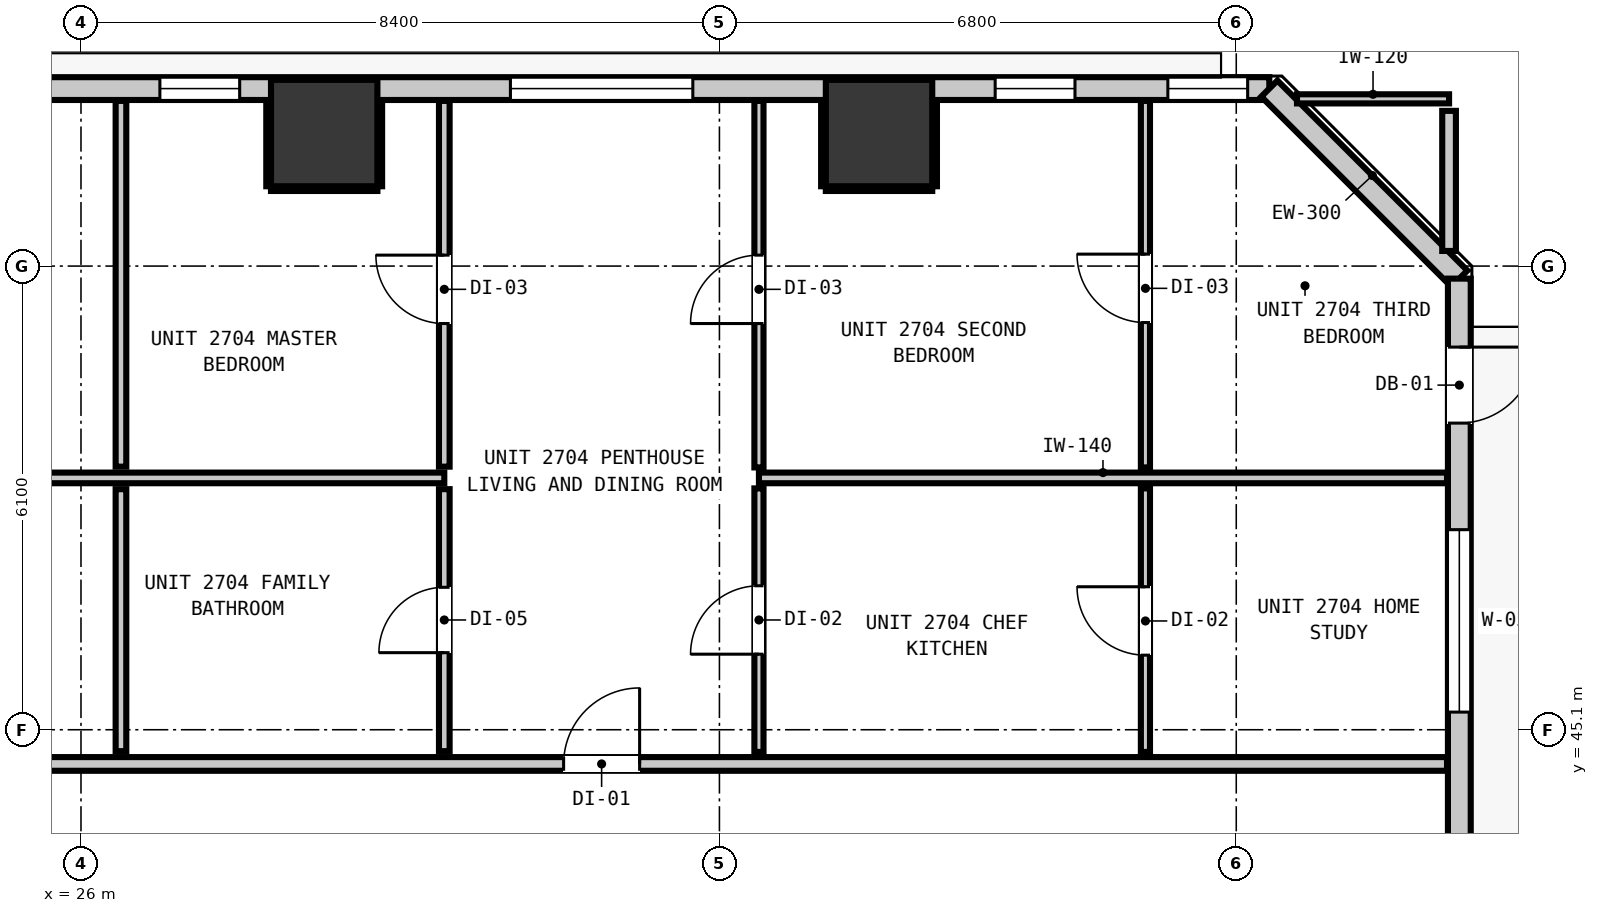
"""IFC4 building model, lengths in metres.
Left out: names, types, materials, properties, quantities, classifications, styles, units other than length and angle.
Written with IfcOpenShell. Run it as: python <this file> out.ifc"""

import sys

from ifc_helpers import new_model, si_unit, direction, frame, frame_2d, origin, origin_2d, place, context, subcontext, project, spatial, rectangle, extrude, element, fill, save


model = new_model("IFC4")
c1 = context("Model", 3, precision=1e-05, world=origin(), true_north=direction((0.0, 1.0)))
c2 = subcontext(c1, "Body", "Model", "MODEL_VIEW")
j1 = project(units=[si_unit("LENGTHUNIT", "METRE"), si_unit("PLANEANGLEUNIT", "RADIAN")], contexts=[c1])
p1 = place(None, origin())
s1 = spatial("IfcSite", under=j1, at=p1, CompositionType="ELEMENT")
p2 = place(p1, origin())
s2 = spatial("IfcBuilding", under=s1, at=p2, CompositionType="ELEMENT")
p3 = place(p2, frame((0.0, 0.0, 96.12)))
s3 = spatial("IfcBuildingStorey", under=s2, at=p3, CompositionType="ELEMENT", Elevation=96.12)
for number, where, z_axis, x_axis in (
    (1, (29.2, 52.95, 0.0), (0.0, 0.0, 1.0), (1.0, 0.0, 0.0)),
    (2, (36.5, 52.95, 0.0), (0.0, 0.0, 1.0), (1.0, 0.0, 0.0)),
):
    element("IfcColumn", number, at=place(p3, frame(where, z_axis=z_axis, x_axis=x_axis)), inside=s3, PredefinedType="COLUMN", context=c2, shape_type="SweptSolid", body=[
        extrude(rectangle(XDim=1.4, YDim=1.4, at=origin_2d()), origin(), (0.0, 0.0, 1.0), 3.32),
    ])
p4 = place(p3, frame((4.165, 53.535, 0.0), z_axis=(0.0, 0.0, 1.0), x_axis=(1.0, 0.0, 0.0)))
e3 = element("IfcWall", 3, at=p4, inside=s3, PredefinedType="STANDARD", context=c2, shape_type="SweptSolid", body=[
    extrude(rectangle(XDim=37.47, YDim=0.3, at=frame_2d((18.735, 0.0))), origin(), (0.0, 0.0, 1.0), 3.06),
])
p5 = place(p4, frame((0.901, 0.0, 0.0)))
e4 = element("IfcOpeningElement", 4, at=p5, cuts=e3, PredefinedType="OPENING", context=c2, shape_type="SweptSolid", body=[
    extrude(rectangle(XDim=1.0, YDim=2.15, at=frame_2d((0.5, 1.075))), frame((0.0, 0.16, 0.0), z_axis=(0.0, -1.0, 0.0), x_axis=(1.0, 0.0, 0.0)), (0.0, 0.0, 1.0), 0.32),
])
p6 = place(p4, frame((11.245, 0.0, 0.85)))
e5 = element("IfcOpeningElement", 5, at=p6, cuts=e3, PredefinedType="OPENING", context=c2, shape_type="SweptSolid", body=[
    extrude(rectangle(XDim=2.4, YDim=1.95, at=frame_2d((1.2, 0.975))), frame((0.0, 0.16, 0.0), z_axis=(0.0, -1.0, 0.0), x_axis=(1.0, 0.0, 0.0)), (0.0, 0.0, 1.0), 0.32),
])
p7 = place(p4, frame((2.286, 0.0, 0.85)))
e6 = element("IfcOpeningElement", 6, at=p7, cuts=e3, PredefinedType="OPENING", context=c2, shape_type="SweptSolid", body=[
    extrude(rectangle(XDim=1.05, YDim=1.65, at=frame_2d((0.525, 0.825))), frame((0.0, 0.16, 0.0), z_axis=(0.0, -1.0, 0.0), x_axis=(1.0, 0.0, 0.0)), (0.0, 0.0, 1.0), 0.32),
])
p8 = place(p4, frame((18.598, 0.0, 0.85)))
e7 = element("IfcOpeningElement", 7, at=p8, cuts=e3, PredefinedType="OPENING", context=c2, shape_type="SweptSolid", body=[
    extrude(rectangle(XDim=2.4, YDim=1.95, at=frame_2d((1.2, 0.975))), frame((0.0, 0.16, 0.0), z_axis=(0.0, -1.0, 0.0), x_axis=(1.0, 0.0, 0.0)), (0.0, 0.0, 1.0), 0.32),
])
p9 = place(p4, frame((27.485, 0.0, 0.85)))
e8 = element("IfcOpeningElement", 8, at=p9, cuts=e3, PredefinedType="OPENING", context=c2, shape_type="SweptSolid", body=[
    extrude(rectangle(XDim=2.4, YDim=1.95, at=frame_2d((1.2, 0.975))), frame((0.0, 0.16, 0.0), z_axis=(0.0, -1.0, 0.0), x_axis=(1.0, 0.0, 0.0)), (0.0, 0.0, 1.0), 0.32),
])
p10 = place(p4, frame((22.873, 0.0, 0.85)))
e9 = element("IfcOpeningElement", 9, at=p10, cuts=e3, PredefinedType="OPENING", context=c2, shape_type="SweptSolid", body=[
    extrude(rectangle(XDim=1.05, YDim=1.65, at=frame_2d((0.525, 0.825))), frame((0.0, 0.16, 0.0), z_axis=(0.0, -1.0, 0.0), x_axis=(1.0, 0.0, 0.0)), (0.0, 0.0, 1.0), 0.32),
])
p11 = place(p4, frame((33.863, 0.0, 0.85)))
e10 = element("IfcOpeningElement", 10, at=p11, cuts=e3, PredefinedType="OPENING", context=c2, shape_type="SweptSolid", body=[
    extrude(rectangle(XDim=1.05, YDim=1.65, at=frame_2d((0.525, 0.825))), frame((0.0, 0.16, 0.0), z_axis=(0.0, -1.0, 0.0), x_axis=(1.0, 0.0, 0.0)), (0.0, 0.0, 1.0), 0.32),
])
p12 = place(p4, frame((36.135, 0.0, 0.85)))
e11 = element("IfcOpeningElement", 11, at=p12, cuts=e3, PredefinedType="OPENING", context=c2, shape_type="SweptSolid", body=[
    extrude(rectangle(XDim=1.05, YDim=1.65, at=frame_2d((0.525, 0.825))), frame((0.0, 0.16, 0.0), z_axis=(0.0, -1.0, 0.0), x_axis=(1.0, 0.0, 0.0)), (0.0, 0.0, 1.0), 0.32),
])
p13 = place(p3, frame((41.635, 53.535, 0.0), z_axis=(0.0, 0.0, 1.0), x_axis=(0.707106781187, -0.707106781187, 0.0)))
e12 = element("IfcWall", 12, at=p13, inside=s3, PredefinedType="STANDARD", context=c2, shape_type="SweptSolid", body=[
    extrude(rectangle(XDim=3.536, YDim=0.3, at=frame_2d((1.768, 0.0))), origin(), (0.0, 0.0, 1.0), 3.06),
])
p14 = place(p3, frame((44.135, 51.035, 0.0), z_axis=(0.0, 0.0, 1.0), x_axis=(0.0, -1.0, 0.0)))
e13 = element("IfcWall", 13, at=p14, inside=s3, PredefinedType="STANDARD", context=c2, shape_type="SweptSolid", body=[
    extrude(rectangle(XDim=34.67, YDim=0.3, at=frame_2d((17.335, 0.0))), origin(), (0.0, 0.0, 1.0), 3.06),
])
p15 = place(p14, frame((0.901, 0.0, 0.0)))
e14 = element("IfcOpeningElement", 14, at=p15, cuts=e13, PredefinedType="OPENING", context=c2, shape_type="SweptSolid", body=[
    extrude(rectangle(XDim=1.0, YDim=2.15, at=frame_2d((0.5, 1.075))), frame((0.0, 0.16, 0.0), z_axis=(0.0, -1.0, 0.0), x_axis=(1.0, 0.0, 0.0)), (0.0, 0.0, 1.0), 0.32),
])
p16 = place(p14, frame((3.303, 0.0, 0.85)))
e15 = element("IfcOpeningElement", 15, at=p16, cuts=e13, PredefinedType="OPENING", context=c2, shape_type="SweptSolid", body=[
    extrude(rectangle(XDim=2.4, YDim=1.95, at=frame_2d((1.2, 0.975))), frame((0.0, 0.16, 0.0), z_axis=(0.0, -1.0, 0.0), x_axis=(1.0, 0.0, 0.0)), (0.0, 0.0, 1.0), 0.32),
])
p17 = place(p14, frame((21.61, 0.0, 0.85)))
e16 = element("IfcOpeningElement", 16, at=p17, cuts=e13, PredefinedType="OPENING", context=c2, shape_type="SweptSolid", body=[
    extrude(rectangle(XDim=2.4, YDim=1.95, at=frame_2d((1.2, 0.975))), frame((0.0, 0.16, 0.0), z_axis=(0.0, -1.0, 0.0), x_axis=(1.0, 0.0, 0.0)), (0.0, 0.0, 1.0), 0.32),
])
p18 = place(p3, frame((1.827, 44.65, 0.0), z_axis=(0.0, 0.0, 1.0), x_axis=(1.0, 0.0, 0.0)))
e17 = element("IfcWall", 17, at=p18, inside=s3, PredefinedType="PARTITIONING", context=c2, shape_type="SweptSolid", body=[
    extrude(rectangle(XDim=42.146, YDim=0.18, at=frame_2d((21.073, 0.0))), origin(), (0.0, 0.0, 1.0), 3.06),
])
p19 = place(p18, frame((11.176, 0.0, 0.0)))
e18 = element("IfcOpeningElement", 18, at=p19, cuts=e17, PredefinedType="OPENING", context=c2, shape_type="SweptSolid", body=[
    extrude(rectangle(XDim=1.0, YDim=2.15, at=frame_2d((0.5, 1.075))), frame((0.0, 0.1, 0.0), z_axis=(0.0, -1.0, 0.0), x_axis=(1.0, 0.0, 0.0)), (0.0, 0.0, 1.0), 0.2),
])
p20 = place(p18, frame((30.523, 0.0, 0.0)))
e19 = element("IfcOpeningElement", 19, at=p20, cuts=e17, PredefinedType="OPENING", context=c2, shape_type="SweptSolid", body=[
    extrude(rectangle(XDim=1.0, YDim=2.15, at=frame_2d((0.5, 1.075))), frame((0.0, 0.1, 0.0), z_axis=(0.0, -1.0, 0.0), x_axis=(1.0, 0.0, 0.0)), (0.0, 0.0, 1.0), 0.2),
])
p21 = place(p3, frame((1.827, 48.413, 0.0), z_axis=(0.0, 0.0, 1.0), x_axis=(1.0, 0.0, 0.0)))
e20 = element("IfcWall", 20, at=p21, inside=s3, PredefinedType="PARTITIONING", context=c2, shape_type="SweptSolid", body=[
    extrude(rectangle(XDim=28.953, YDim=0.14, at=frame_2d((14.477, 0.0))), origin(), (0.0, 0.0, 1.0), 3.06),
])
p22 = place(p21, frame((11.226, 0.0, 0.0)))
e21 = element("IfcOpeningElement", 21, at=p22, cuts=e20, PredefinedType="OPENING", context=c2, shape_type="SweptSolid", body=[
    extrude(rectangle(XDim=0.9, YDim=2.1, at=frame_2d((0.45, 1.05))), frame((0.0, 0.08, 0.0), z_axis=(0.0, -1.0, 0.0), x_axis=(1.0, 0.0, 0.0)), (0.0, 0.0, 1.0), 0.16),
])
p23 = place(p3, frame((34.92, 48.413, 0.0), z_axis=(0.0, 0.0, 1.0), x_axis=(1.0, 0.0, 0.0)))
e22 = element("IfcWall", 22, at=p23, inside=s3, PredefinedType="PARTITIONING", context=c2, shape_type="SweptSolid", body=[
    extrude(rectangle(XDim=9.053, YDim=0.14, at=frame_2d((4.526, 0.0))), origin(), (0.0, 0.0, 1.0), 3.06),
])
p24 = place(p3, frame((41.999, 53.4, 0.0), z_axis=(0.0, 0.0, 1.0), x_axis=(1.0, 0.0, 0.0)))
e23 = element("IfcWall", 23, at=p24, inside=s3, PredefinedType="PARTITIONING", context=c2, shape_type="SweptSolid", body=[
    extrude(rectangle(XDim=2.001, YDim=0.12, at=frame_2d((1.0, 0.0))), origin(), (0.0, 0.0, 1.0), 3.06),
])
p25 = place(p3, frame((44.0, 51.399, 0.0), z_axis=(0.0, 0.0, 1.0), x_axis=(0.0, 1.0, 0.0)))
e24 = element("IfcWall", 24, at=p25, inside=s3, PredefinedType="PARTITIONING", context=c2, shape_type="SweptSolid", body=[
    extrude(rectangle(XDim=1.843, YDim=0.18, at=frame_2d((0.921, 0.0))), origin(), (0.0, 0.0, 1.0), 3.06),
])
p26 = place(p3, frame((26.526, 44.818, 0.0), z_axis=(0.0, 0.0, 1.0), x_axis=(0.0, 1.0, 0.0)))
e25 = element("IfcWall", 25, at=p26, inside=s3, PredefinedType="PARTITIONING", context=c2, shape_type="SweptSolid", body=[
    extrude(rectangle(XDim=3.447, YDim=0.14, at=frame_2d((1.723, 0.0))), origin(), (0.0, 0.0, 1.0), 3.06),
])
p27 = place(p3, frame((26.526, 48.561, 0.0), z_axis=(0.0, 0.0, 1.0), x_axis=(0.0, 1.0, 0.0)))
e26 = element("IfcWall", 26, at=p27, inside=s3, PredefinedType="PARTITIONING", context=c2, shape_type="SweptSolid", body=[
    extrude(rectangle(XDim=4.812, YDim=0.14, at=frame_2d((2.406, 0.0))), origin(), (0.0, 0.0, 1.0), 3.06),
])
p28 = place(p3, frame((30.78, 44.818, 0.0), z_axis=(0.0, 0.0, 1.0), x_axis=(0.0, 1.0, 0.0)))
e27 = element("IfcWall", 27, at=p28, inside=s3, PredefinedType="PARTITIONING", context=c2, shape_type="SweptSolid", body=[
    extrude(rectangle(XDim=3.447, YDim=0.14, at=frame_2d((1.723, 0.0))), origin(), (0.0, 0.0, 1.0), 3.06),
])
p29 = place(p28, frame((1.296, 0.0, 0.0)))
e28 = element("IfcOpeningElement", 28, at=p29, cuts=e27, PredefinedType="OPENING", context=c2, shape_type="SweptSolid", body=[
    extrude(rectangle(XDim=0.86, YDim=2.02, at=frame_2d((0.43, 1.01))), frame((0.0, 0.08, 0.0), z_axis=(0.0, -1.0, 0.0), x_axis=(1.0, 0.0, 0.0)), (0.0, 0.0, 1.0), 0.16),
])
p30 = place(p3, frame((30.78, 48.561, 0.0), z_axis=(0.0, 0.0, 1.0), x_axis=(0.0, 1.0, 0.0)))
e29 = element("IfcWall", 29, at=p30, inside=s3, PredefinedType="PARTITIONING", context=c2, shape_type="SweptSolid", body=[
    extrude(rectangle(XDim=4.812, YDim=0.14, at=frame_2d((2.406, 0.0))), origin(), (0.0, 0.0, 1.0), 3.06),
])
p31 = place(p30, frame((1.883, 0.0, 0.0)))
e30 = element("IfcOpeningElement", 30, at=p31, cuts=e29, PredefinedType="OPENING", context=c2, shape_type="SweptSolid", body=[
    extrude(rectangle(XDim=0.9, YDim=2.1, at=frame_2d((0.45, 1.05))), frame((0.0, 0.08, 0.0), z_axis=(0.0, -1.0, 0.0), x_axis=(1.0, 0.0, 0.0)), (0.0, 0.0, 1.0), 0.16),
])
p32 = place(p3, frame((34.92, 44.808, 0.0), z_axis=(0.0, 0.0, 1.0), x_axis=(0.0, 1.0, 0.0)))
e31 = element("IfcWall", 31, at=p32, inside=s3, PredefinedType="PARTITIONING", context=c2, shape_type="SweptSolid", body=[
    extrude(rectangle(XDim=3.467, YDim=0.12, at=frame_2d((1.733, 0.0))), origin(), (0.0, 0.0, 1.0), 3.06),
])
p33 = place(p32, frame((1.286, 0.0, 0.0)))
e32 = element("IfcOpeningElement", 32, at=p33, cuts=e31, PredefinedType="OPENING", context=c2, shape_type="SweptSolid", body=[
    extrude(rectangle(XDim=0.9, YDim=2.1, at=frame_2d((0.45, 1.05))), frame((0.0, 0.07, 0.0), z_axis=(0.0, -1.0, 0.0), x_axis=(1.0, 0.0, 0.0)), (0.0, 0.0, 1.0), 0.14),
])
p34 = place(p3, frame((34.92, 48.551, 0.0), z_axis=(0.0, 0.0, 1.0), x_axis=(0.0, 1.0, 0.0)))
e33 = element("IfcWall", 33, at=p34, inside=s3, PredefinedType="PARTITIONING", context=c2, shape_type="SweptSolid", body=[
    extrude(rectangle(XDim=4.822, YDim=0.12, at=frame_2d((2.411, 0.0))), origin(), (0.0, 0.0, 1.0), 3.06),
])
p35 = place(p34, frame((1.893, 0.0, 0.0)))
e34 = element("IfcOpeningElement", 34, at=p35, cuts=e33, PredefinedType="OPENING", context=c2, shape_type="SweptSolid", body=[
    extrude(rectangle(XDim=0.9, YDim=2.1, at=frame_2d((0.45, 1.05))), frame((0.0, 0.07, 0.0), z_axis=(0.0, -1.0, 0.0), x_axis=(1.0, 0.0, 0.0)), (0.0, 0.0, 1.0), 0.14),
])
p36 = place(p3, frame((40.005, 44.808, 0.0), z_axis=(0.0, 0.0, 1.0), x_axis=(0.0, 1.0, 0.0)))
e35 = element("IfcWall", 35, at=p36, inside=s3, PredefinedType="PARTITIONING", context=c2, shape_type="SweptSolid", body=[
    extrude(rectangle(XDim=3.467, YDim=0.12, at=frame_2d((1.733, 0.0))), origin(), (0.0, 0.0, 1.0), 2.445),
])
p37 = place(p36, frame((1.273, 0.0, 0.0)))
e36 = element("IfcOpeningElement", 36, at=p37, cuts=e35, PredefinedType="OPENING", context=c2, shape_type="SweptSolid", body=[
    extrude(rectangle(XDim=0.9, YDim=2.1, at=frame_2d((0.45, 1.05))), frame((0.0, 0.07, 0.0), z_axis=(0.0, -1.0, 0.0), x_axis=(1.0, 0.0, 0.0)), (0.0, 0.0, 1.0), 0.14),
])
p38 = place(p3, frame((40.005, 48.551, 0.0), z_axis=(0.0, 0.0, 1.0), x_axis=(0.0, 1.0, 0.0)))
e37 = element("IfcWall", 37, at=p38, inside=s3, PredefinedType="PARTITIONING", context=c2, shape_type="SweptSolid", body=[
    extrude(rectangle(XDim=4.822, YDim=0.12, at=frame_2d((2.411, 0.0))), origin(), (0.0, 0.0, 1.0), 3.06),
])
p39 = place(p38, frame((1.906, 0.0, 0.0)))
e38 = element("IfcOpeningElement", 38, at=p39, cuts=e37, PredefinedType="OPENING", context=c2, shape_type="SweptSolid", body=[
    extrude(rectangle(XDim=0.9, YDim=2.1, at=frame_2d((0.45, 1.05))), frame((0.0, 0.07, 0.0), z_axis=(0.0, -1.0, 0.0), x_axis=(1.0, 0.0, 0.0)), (0.0, 0.0, 1.0), 0.14),
])
p40 = place(p3, frame((28.5, 52.218, 0.0), z_axis=(0.0, 0.0, 1.0), x_axis=(1.0, 0.0, 0.0)))
e39 = element("IfcWall", 39, at=p40, inside=s3, PredefinedType="PARTITIONING", context=c2, shape_type="SweptSolid", body=[
    extrude(rectangle(XDim=1.4, YDim=0.06, at=frame_2d((0.7, 0.0))), origin(), (0.0, 0.0, 1.0), 1.45),
])
for number, where, z_axis, x_axis in (
    (40, (28.468, 52.25, 0.0), (0.0, 0.0, 1.0), (0.0, 1.0, 0.0)),
    (41, (29.932, 52.25, 0.0), (0.0, 0.0, 1.0), (0.0, 1.0, 0.0)),
):
    element("IfcWall", number, at=place(p3, frame(where, z_axis=z_axis, x_axis=x_axis)), inside=s3, PredefinedType="PARTITIONING", context=c2, shape_type="SweptSolid", body=[
        extrude(rectangle(XDim=1.12, YDim=0.06, at=frame_2d((0.56, 0.0))), origin(), (0.0, 0.0, 1.0), 1.45),
    ])
p41 = place(p3, frame((35.8, 52.218, 0.0), z_axis=(0.0, 0.0, 1.0), x_axis=(1.0, 0.0, 0.0)))
e42 = element("IfcWall", 42, at=p41, inside=s3, PredefinedType="PARTITIONING", context=c2, shape_type="SweptSolid", body=[
    extrude(rectangle(XDim=1.4, YDim=0.06, at=frame_2d((0.7, 0.0))), origin(), (0.0, 0.0, 1.0), 1.45),
])
for number, where, z_axis, x_axis in (
    (43, (35.768, 52.25, 0.0), (0.0, 0.0, 1.0), (0.0, 1.0, 0.0)),
    (44, (37.232, 52.25, 0.0), (0.0, 0.0, 1.0), (0.0, 1.0, 0.0)),
):
    element("IfcWall", number, at=place(p3, frame(where, z_axis=z_axis, x_axis=x_axis)), inside=s3, PredefinedType="PARTITIONING", context=c2, shape_type="SweptSolid", body=[
        extrude(rectangle(XDim=1.12, YDim=0.06, at=frame_2d((0.56, 0.0))), origin(), (0.0, 0.0, 1.0), 1.45),
    ])
p42 = place(p15, origin())
e45 = element("IfcDoor", 45, at=p42, inside=s3, OperationType="SINGLE_SWING_LEFT", PredefinedType="DOOR", context=c2, shape_type="SweptSolid", body=[
    extrude(rectangle(XDim=1.0, YDim=2.15, at=frame_2d((0.5, 1.075))), frame((0.0, 0.025, 0.0), z_axis=(0.0, -1.0, 0.0), x_axis=(1.0, 0.0, 0.0)), (0.0, 0.0, 1.0), 0.05),
])
fill(e14, e45)
p43 = place(p9, origin())
e46 = element("IfcWindow", 46, at=p43, inside=s3, PartitioningType="SINGLE_PANEL", PredefinedType="WINDOW", context=c2, shape_type="SweptSolid", body=[
    extrude(rectangle(XDim=2.4, YDim=1.95, at=frame_2d((1.2, 0.975))), frame((0.0, 0.03, 0.0), z_axis=(0.0, -1.0, 0.0), x_axis=(1.0, 0.0, 0.0)), (0.0, 0.0, 1.0), 0.06),
])
fill(e8, e46)
p44 = place(p10, origin())
e47 = element("IfcWindow", 47, at=p44, inside=s3, PartitioningType="SINGLE_PANEL", PredefinedType="WINDOW", context=c2, shape_type="SweptSolid", body=[
    extrude(rectangle(XDim=1.05, YDim=1.65, at=frame_2d((0.525, 0.825))), frame((0.0, 0.03, 0.0), z_axis=(0.0, -1.0, 0.0), x_axis=(1.0, 0.0, 0.0)), (0.0, 0.0, 1.0), 0.06),
])
fill(e9, e47)
p45 = place(p11, origin())
e48 = element("IfcWindow", 48, at=p45, inside=s3, PartitioningType="SINGLE_PANEL", PredefinedType="WINDOW", context=c2, shape_type="SweptSolid", body=[
    extrude(rectangle(XDim=1.05, YDim=1.65, at=frame_2d((0.525, 0.825))), frame((0.0, 0.03, 0.0), z_axis=(0.0, -1.0, 0.0), x_axis=(1.0, 0.0, 0.0)), (0.0, 0.0, 1.0), 0.06),
])
fill(e10, e48)
p46 = place(p12, origin())
e49 = element("IfcWindow", 49, at=p46, inside=s3, PartitioningType="SINGLE_PANEL", PredefinedType="WINDOW", context=c2, shape_type="SweptSolid", body=[
    extrude(rectangle(XDim=1.05, YDim=1.65, at=frame_2d((0.525, 0.825))), frame((0.0, 0.03, 0.0), z_axis=(0.0, -1.0, 0.0), x_axis=(1.0, 0.0, 0.0)), (0.0, 0.0, 1.0), 0.06),
])
fill(e11, e49)
p47 = place(p16, origin())
e50 = element("IfcWindow", 50, at=p47, inside=s3, PartitioningType="SINGLE_PANEL", PredefinedType="WINDOW", context=c2, shape_type="SweptSolid", body=[
    extrude(rectangle(XDim=2.4, YDim=1.95, at=frame_2d((1.2, 0.975))), frame((0.0, 0.03, 0.0), z_axis=(0.0, -1.0, 0.0), x_axis=(1.0, 0.0, 0.0)), (0.0, 0.0, 1.0), 0.06),
])
fill(e15, e50)
p48 = place(p20, origin())
e51 = element("IfcDoor", 51, at=p48, inside=s3, OperationType="SINGLE_SWING_RIGHT", PredefinedType="DOOR", context=c2, shape_type="SweptSolid", body=[
    extrude(rectangle(XDim=1.0, YDim=2.15, at=frame_2d((0.5, 1.075))), frame((0.0, 0.025, 0.0), z_axis=(0.0, -1.0, 0.0), x_axis=(1.0, 0.0, 0.0)), (0.0, 0.0, 1.0), 0.05),
])
fill(e19, e51)
p49 = place(p29, origin())
e52 = element("IfcDoor", 52, at=p49, inside=s3, OperationType="SINGLE_SWING_LEFT", PredefinedType="DOOR", context=c2, shape_type="SweptSolid", body=[
    extrude(rectangle(XDim=0.86, YDim=2.02, at=frame_2d((0.43, 1.01))), frame((0.0, 0.025, 0.0), z_axis=(0.0, -1.0, 0.0), x_axis=(1.0, 0.0, 0.0)), (0.0, 0.0, 1.0), 0.05),
])
fill(e28, e52)
p50 = place(p31, origin())
e53 = element("IfcDoor", 53, at=p50, inside=s3, OperationType="SINGLE_SWING_RIGHT", PredefinedType="DOOR", context=c2, shape_type="SweptSolid", body=[
    extrude(rectangle(XDim=0.9, YDim=2.1, at=frame_2d((0.45, 1.05))), frame((0.0, 0.025, 0.0), z_axis=(0.0, -1.0, 0.0), x_axis=(1.0, 0.0, 0.0)), (0.0, 0.0, 1.0), 0.05),
])
fill(e30, e53)
p51 = place(p33, origin())
e54 = element("IfcDoor", 54, at=p51, inside=s3, OperationType="SINGLE_SWING_LEFT", PredefinedType="DOOR", context=c2, shape_type="SweptSolid", body=[
    extrude(rectangle(XDim=0.9, YDim=2.1, at=frame_2d((0.45, 1.05))), frame((0.0, 0.025, 0.0), z_axis=(0.0, -1.0, 0.0), x_axis=(1.0, 0.0, 0.0)), (0.0, 0.0, 1.0), 0.05),
])
fill(e32, e54)
p52 = place(p37, origin())
e55 = element("IfcDoor", 55, at=p52, inside=s3, OperationType="SINGLE_SWING_RIGHT", PredefinedType="DOOR", context=c2, shape_type="SweptSolid", body=[
    extrude(rectangle(XDim=0.9, YDim=2.1, at=frame_2d((0.45, 1.05))), frame((0.0, 0.025, 0.0), z_axis=(0.0, -1.0, 0.0), x_axis=(1.0, 0.0, 0.0)), (0.0, 0.0, 1.0), 0.05),
])
fill(e36, e55)
p53 = place(p35, origin())
e56 = element("IfcDoor", 56, at=p53, inside=s3, OperationType="SINGLE_SWING_LEFT", PredefinedType="DOOR", context=c2, shape_type="SweptSolid", body=[
    extrude(rectangle(XDim=0.9, YDim=2.1, at=frame_2d((0.45, 1.05))), frame((0.0, 0.025, 0.0), z_axis=(0.0, -1.0, 0.0), x_axis=(1.0, 0.0, 0.0)), (0.0, 0.0, 1.0), 0.05),
])
fill(e34, e56)
p54 = place(p39, origin())
e57 = element("IfcDoor", 57, at=p54, inside=s3, OperationType="SINGLE_SWING_RIGHT", PredefinedType="DOOR", context=c2, shape_type="SweptSolid", body=[
    extrude(rectangle(XDim=0.9, YDim=2.1, at=frame_2d((0.45, 1.05))), frame((0.0, 0.025, 0.0), z_axis=(0.0, -1.0, 0.0), x_axis=(1.0, 0.0, 0.0)), (0.0, 0.0, 1.0), 0.05),
])
fill(e38, e57)
save(model, sys.argv[1])
